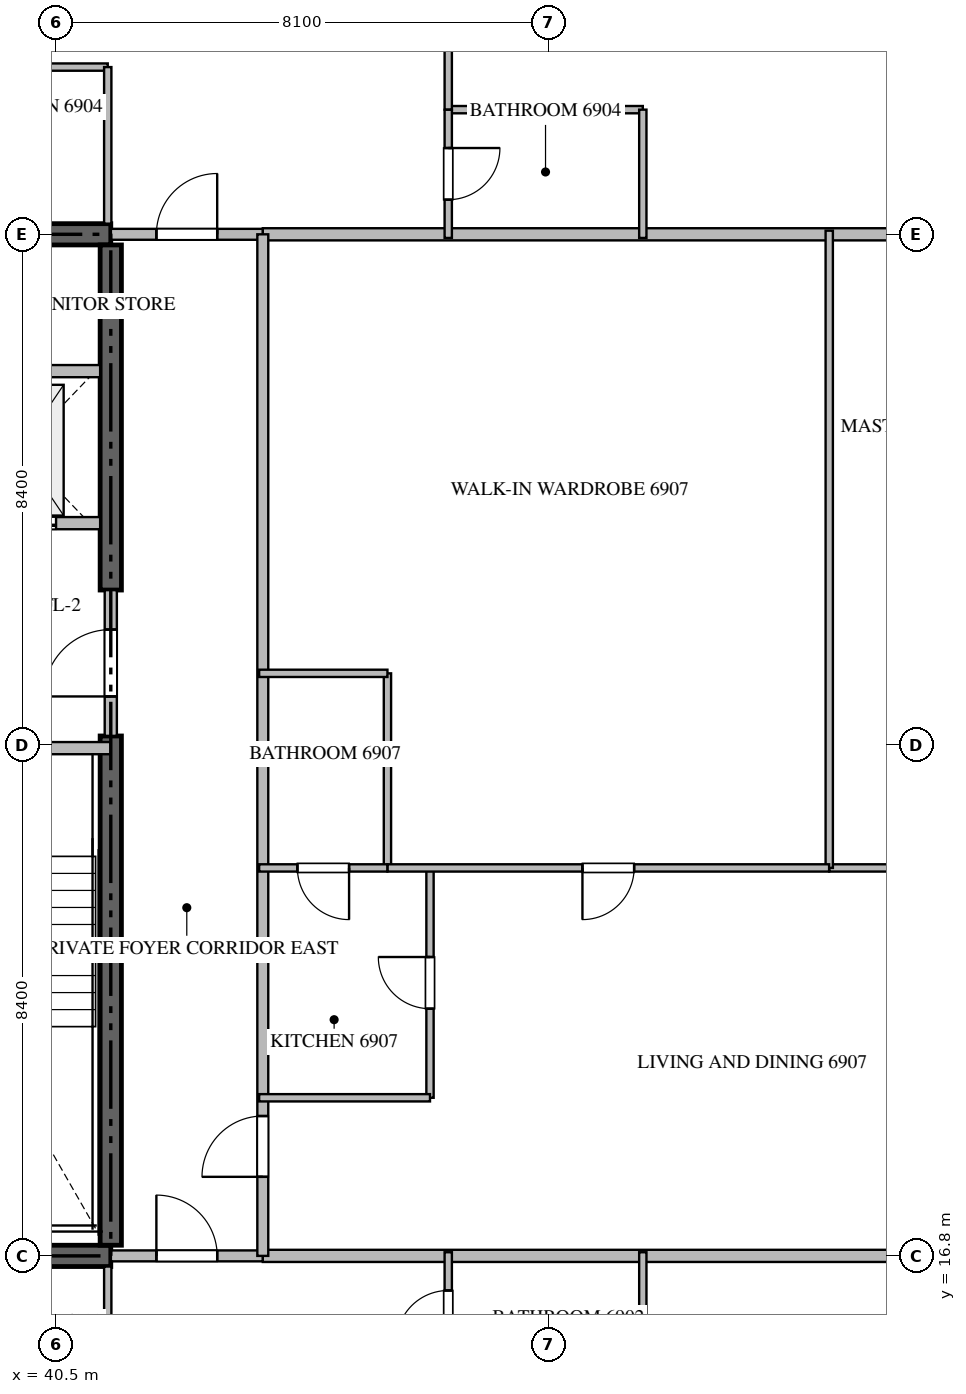
"""IFC4 building model, lengths in metres.
Left out: names, types, materials, properties, quantities, classifications, styles, units other than length and angle.
Written with IfcOpenShell. Run it as: python <this file> out.ifc"""

import sys

from ifc_helpers import new_model, si_unit, direction, frame, frame_2d, origin, place, context, subcontext, project, spatial, rectangle, extrude, source, transform, mapped, element, fill, save


model = new_model("IFC4")
c1 = context("Model", 3, precision=1e-05, world=origin(), true_north=direction((0.0, 1.0)))
c2 = subcontext(c1, "Body", "Model", "MODEL_VIEW")
j1 = project(units=[si_unit("LENGTHUNIT", "METRE"), si_unit("PLANEANGLEUNIT", "RADIAN")], contexts=[c1])
p1 = place(None, origin())
s1 = spatial("IfcSite", under=j1, at=p1, CompositionType="ELEMENT")
p2 = place(p1, origin())
s2 = spatial("IfcBuilding", under=s1, at=p2, CompositionType="ELEMENT")
p3 = place(p2, frame((0.0, 0.0, 275.9)))
s3 = spatial("IfcBuildingStorey", under=s2, at=p3, CompositionType="ELEMENT", Elevation=275.9)
for number, where, z_axis, x_axis in (
    (1, (23.4, 16.8, -0.26), (0.0, 0.0, 1.0), (1.0, 0.0, 0.0)),
    (2, (41.4, 33.6, -0.26), (0.0, 0.0, 1.0), (-1.0, 0.0, 0.0)),
):
    element("IfcWall", number, at=place(p3, frame(where, z_axis=z_axis, x_axis=x_axis)), inside=s3, PredefinedType="SHEAR", context=c2, shape_type="SweptSolid", body=[
        extrude(rectangle(XDim=18.0, YDim=0.35, at=frame_2d((9.0, 0.0))), origin(), (0.0, 0.0, 1.0), 3.848),
    ])
p4 = place(p3, frame((41.4, 16.975, -0.26), z_axis=(0.0, 0.0, 1.0), x_axis=(0.0, 1.0, 0.0)))
e3 = element("IfcWall", 3, at=p4, inside=s3, PredefinedType="SHEAR", context=c2, shape_type="SweptSolid", body=[
    extrude(rectangle(XDim=8.375, YDim=0.35, at=frame_2d((4.188, 0.0))), origin(), (0.0, 0.0, 1.0), 3.848),
])
p5 = place(p3, frame((41.4, 27.75, -0.26), z_axis=(0.0, 0.0, 1.0), x_axis=(0.0, 1.0, 0.0)))
e4 = element("IfcWall", 4, at=p5, inside=s3, PredefinedType="SHEAR", context=c2, shape_type="SweptSolid", body=[
    extrude(rectangle(XDim=5.675, YDim=0.35, at=frame_2d((2.837, 0.0))), origin(), (0.0, 0.0, 1.0), 3.848),
])
p6 = place(p3, frame((36.95, 25.15, 0.0), z_axis=(0.0, 0.0, 1.0), x_axis=(1.0, 0.0, 0.0)))
e5 = element("IfcWall", 5, at=p6, inside=s3, PredefinedType="STANDARD", context=c2, shape_type="SweptSolid", body=[
    extrude(rectangle(XDim=4.45, YDim=0.2, at=frame_2d((2.225, 0.0))), origin(), (0.0, 0.0, 1.0), 3.59),
])
p7 = place(p6, frame((1.65, 0.0, 0.0)))
e6 = element("IfcOpeningElement", 6, at=p7, cuts=e5, PredefinedType="OPENING", context=c2, shape_type="SweptSolid", body=[
    extrude(rectangle(XDim=1.1, YDim=2.15, at=frame_2d((0.55, 1.075))), frame((0.0, 0.11, 0.0), z_axis=(0.0, -1.0, 0.0), x_axis=(1.0, 0.0, 0.0)), (0.0, 0.0, 1.0), 0.22),
])
p8 = place(p3, frame((38.75, 28.85, 0.0), z_axis=(0.0, 0.0, 1.0), x_axis=(1.0, 0.0, 0.0)))
e7 = element("IfcWall", 7, at=p8, inside=s3, PredefinedType="STANDARD", context=c2, shape_type="SweptSolid", body=[
    extrude(rectangle(XDim=2.475, YDim=0.2, at=frame_2d((1.238, 0.0))), origin(), (0.0, 0.0, 1.0), 3.59),
])
p9 = place(p8, frame((0.55, 0.0, 0.0)))
e8 = element("IfcOpeningElement", 8, at=p9, cuts=e7, PredefinedType="OPENING", context=c2, shape_type="SweptSolid", body=[
    extrude(rectangle(XDim=1.2, YDim=2.2, at=frame_2d((0.6, 1.1))), frame((0.0, 0.11, 0.0), z_axis=(0.0, -1.0, 0.0), x_axis=(1.0, 0.0, 0.0)), (0.0, 0.0, 1.0), 0.22),
])
p10 = place(p3, frame((38.75, 31.35, 0.0), z_axis=(0.0, 0.0, 1.0), x_axis=(1.0, 0.0, 0.0)))
e9 = element("IfcWall", 9, at=p10, inside=s3, PredefinedType="STANDARD", context=c2, shape_type="SweptSolid", body=[
    extrude(rectangle(XDim=2.475, YDim=0.2, at=frame_2d((1.238, 0.0))), origin(), (0.0, 0.0, 1.0), 3.59),
])
p11 = place(p3, frame((41.4, 25.352, 0.0), z_axis=(0.0, 0.0, 1.0), x_axis=(0.0, 1.0, 0.0)))
e10 = element("IfcWall", 10, at=p11, inside=s3, PredefinedType="STANDARD", context=c2, shape_type="SweptSolid", body=[
    extrude(rectangle(XDim=2.396, YDim=0.2, at=frame_2d((1.198, 0.0))), origin(), (0.0, 0.0, 1.0), 3.59),
])
p12 = place(p11, frame((0.648, 0.0, 0.0)))
e11 = element("IfcOpeningElement", 11, at=p12, cuts=e10, PredefinedType="OPENING", context=c2, shape_type="SweptSolid", body=[
    extrude(rectangle(XDim=1.1, YDim=2.15, at=frame_2d((0.55, 1.075))), frame((0.0, 0.11, 0.0), z_axis=(0.0, -1.0, 0.0), x_axis=(1.0, 0.0, 0.0)), (0.0, 0.0, 1.0), 0.22),
])
for number, where, z_axis, x_axis in (
    (12, (43.9, 16.8, 0.0), (0.0, 0.0, 1.0), (1.0, 0.0, 0.0)),
    (13, (43.9, 33.6, 0.0), (0.0, 0.0, 1.0), (1.0, 0.0, 0.0)),
):
    element("IfcWall", number, at=place(p3, frame(where, z_axis=z_axis, x_axis=x_axis)), inside=s3, PredefinedType="PARTITIONING", context=c2, shape_type="SweptSolid", body=[
        extrude(rectangle(XDim=13.418, YDim=0.2, at=frame_2d((6.709, 0.0))), origin(), (0.0, 0.0, 1.0), 3.59),
    ])
p13 = place(p3, frame((41.402, 16.8, 0.0), z_axis=(0.0, 0.0, 1.0), x_axis=(1.0, 0.0, 0.0)))
e14 = element("IfcWall", 14, at=p13, inside=s3, PredefinedType="PARTITIONING", context=c2, shape_type="SweptSolid", body=[
    extrude(rectangle(XDim=2.496, YDim=0.18, at=frame_2d((1.248, 0.0))), origin(), (0.0, 0.0, 1.0), 3.59),
])
p14 = place(p13, frame((0.748, 0.0, 0.0)))
e15 = element("IfcOpeningElement", 15, at=p14, cuts=e14, PredefinedType="OPENING", context=c2, shape_type="SweptSolid", body=[
    extrude(rectangle(XDim=1.0, YDim=2.15, at=frame_2d((0.5, 1.075))), frame((0.0, 0.1, 0.0), z_axis=(0.0, -1.0, 0.0), x_axis=(1.0, 0.0, 0.0)), (0.0, 0.0, 1.0), 0.2),
])
p15 = place(p3, frame((41.402, 33.6, 0.0), z_axis=(0.0, 0.0, 1.0), x_axis=(1.0, 0.0, 0.0)))
e16 = element("IfcWall", 16, at=p15, inside=s3, PredefinedType="PARTITIONING", context=c2, shape_type="SweptSolid", body=[
    extrude(rectangle(XDim=2.496, YDim=0.18, at=frame_2d((1.248, 0.0))), origin(), (0.0, 0.0, 1.0), 3.59),
])
p16 = place(p15, frame((0.748, 0.0, 0.0)))
e17 = element("IfcOpeningElement", 17, at=p16, cuts=e16, PredefinedType="OPENING", context=c2, shape_type="SweptSolid", body=[
    extrude(rectangle(XDim=1.0, YDim=2.15, at=frame_2d((0.5, 1.075))), frame((0.0, 0.1, 0.0), z_axis=(0.0, -1.0, 0.0), x_axis=(1.0, 0.0, 0.0)), (0.0, 0.0, 1.0), 0.2),
])
p17 = place(p3, frame((43.9, 16.8, 0.0), z_axis=(0.0, 0.0, 1.0), x_axis=(0.0, 1.0, 0.0)))
e18 = element("IfcWall", 18, at=p17, inside=s3, PredefinedType="PARTITIONING", context=c2, shape_type="SweptSolid", body=[
    extrude(rectangle(XDim=16.8, YDim=0.18, at=frame_2d((8.4, 0.0))), origin(), (0.0, 0.0, 1.0), 3.59),
])
p18 = place(p17, frame((1.3, 0.0, 0.0)))
e19 = element("IfcOpeningElement", 19, at=p18, cuts=e18, PredefinedType="OPENING", context=c2, shape_type="SweptSolid", body=[
    extrude(rectangle(XDim=1.0, YDim=2.15, at=frame_2d((0.5, 1.075))), frame((0.0, 0.1, 0.0), z_axis=(0.0, -1.0, 0.0), x_axis=(1.0, 0.0, 0.0)), (0.0, 0.0, 1.0), 0.2),
])
p19 = place(p3, frame((41.35, 14.05, 0.0), z_axis=(0.0, 0.0, 1.0), x_axis=(0.0, 1.0, 0.0)))
e20 = element("IfcWall", 20, at=p19, inside=s3, PredefinedType="PARTITIONING", context=c2, shape_type="SweptSolid", body=[
    extrude(rectangle(XDim=2.575, YDim=0.12, at=frame_2d((1.288, 0.0))), origin(), (0.0, 0.0, 1.0), 3.59),
])
p20 = place(p3, frame((50.15, 14.75, 0.0), z_axis=(0.0, 0.0, 1.0), x_axis=(0.0, 1.0, 0.0)))
e21 = element("IfcWall", 21, at=p20, inside=s3, PredefinedType="PARTITIONING", context=c2, shape_type="SweptSolid", body=[
    extrude(rectangle(XDim=2.11, YDim=0.12, at=frame_2d((1.055, 0.0))), origin(), (0.0, 0.0, 1.0), 3.59),
])
p21 = place(p3, frame((46.95, 14.752, 0.0), z_axis=(0.0, 0.0, 1.0), x_axis=(0.0, 1.0, 0.0)))
e22 = element("IfcWall", 22, at=p21, inside=s3, PredefinedType="PARTITIONING", context=c2, shape_type="SweptSolid", body=[
    extrude(rectangle(XDim=2.108, YDim=0.12, at=frame_2d((1.054, 0.0))), origin(), (0.0, 0.0, 1.0), 3.59),
])
p22 = place(p21, frame((0.629, 0.0, 0.0)))
e23 = element("IfcOpeningElement", 23, at=p22, cuts=e22, PredefinedType="OPENING", context=c2, shape_type="SweptSolid", body=[
    extrude(rectangle(XDim=0.85, YDim=2.1, at=frame_2d((0.425, 1.05))), frame((0.0, 0.07, 0.0), z_axis=(0.0, -1.0, 0.0), x_axis=(1.0, 0.0, 0.0)), (0.0, 0.0, 1.0), 0.14),
])
p23 = place(p3, frame((38.5, 36.35, 0.0), z_axis=(0.0, 0.0, 1.0), x_axis=(1.0, 0.0, 0.0)))
e24 = element("IfcWall", 24, at=p23, inside=s3, PredefinedType="PARTITIONING", context=c2, shape_type="SweptSolid", body=[
    extrude(rectangle(XDim=2.85, YDim=0.12, at=frame_2d((1.425, 0.0))), origin(), (0.0, 0.0, 1.0), 3.59),
])
p24 = place(p23, frame((1.0, 0.0, 0.0)))
e25 = element("IfcOpeningElement", 25, at=p24, cuts=e24, PredefinedType="OPENING", context=c2, shape_type="SweptSolid", body=[
    extrude(rectangle(XDim=0.85, YDim=2.1, at=frame_2d((0.425, 1.05))), frame((0.0, 0.07, 0.0), z_axis=(0.0, -1.0, 0.0), x_axis=(1.0, 0.0, 0.0)), (0.0, 0.0, 1.0), 0.14),
])
p25 = place(p3, frame((41.35, 36.35, 0.0), z_axis=(0.0, 0.0, 1.0), x_axis=(0.0, -1.0, 0.0)))
e26 = element("IfcWall", 26, at=p25, inside=s3, PredefinedType="PARTITIONING", context=c2, shape_type="SweptSolid", body=[
    extrude(rectangle(XDim=2.575, YDim=0.12, at=frame_2d((1.288, 0.0))), origin(), (0.0, 0.0, 1.0), 3.59),
])
p26 = place(p3, frame((46.95, 35.65, 0.0), z_axis=(0.0, 0.0, 1.0), x_axis=(1.0, 0.0, 0.0)))
e27 = element("IfcWall", 27, at=p26, inside=s3, PredefinedType="PARTITIONING", context=c2, shape_type="SweptSolid", body=[
    extrude(rectangle(XDim=3.2, YDim=0.12, at=frame_2d((1.6, 0.0))), origin(), (0.0, 0.0, 1.0), 3.59),
])
p27 = place(p3, frame((50.15, 35.65, 0.0), z_axis=(0.0, 0.0, 1.0), x_axis=(0.0, -1.0, 0.0)))
e28 = element("IfcWall", 28, at=p27, inside=s3, PredefinedType="PARTITIONING", context=c2, shape_type="SweptSolid", body=[
    extrude(rectangle(XDim=2.11, YDim=0.12, at=frame_2d((1.055, 0.0))), origin(), (0.0, 0.0, 1.0), 3.59),
])
p28 = place(p3, frame((46.95, 41.73, 0.0), z_axis=(0.0, 0.0, 1.0), x_axis=(0.0, -1.0, 0.0)))
e29 = element("IfcWall", 29, at=p28, inside=s3, PredefinedType="PARTITIONING", context=c2, shape_type="SweptSolid", body=[
    extrude(rectangle(XDim=6.08, YDim=0.12, at=frame_2d((3.04, 0.0))), origin(), (0.0, 0.0, 1.0), 3.59),
])
p29 = place(p28, frame((2.615, 0.0, 0.0)))
e30 = element("IfcOpeningElement", 30, at=p29, cuts=e29, PredefinedType="OPENING", context=c2, shape_type="SweptSolid", body=[
    extrude(rectangle(XDim=0.85, YDim=2.1, at=frame_2d((0.425, 1.05))), frame((0.0, 0.07, 0.0), z_axis=(0.0, -1.0, 0.0), x_axis=(1.0, 0.0, 0.0)), (0.0, 0.0, 1.0), 0.14),
])
p30 = place(p3, frame((46.95, 35.648, 0.0), z_axis=(0.0, 0.0, 1.0), x_axis=(0.0, -1.0, 0.0)))
e31 = element("IfcWall", 31, at=p30, inside=s3, PredefinedType="PARTITIONING", context=c2, shape_type="SweptSolid", body=[
    extrude(rectangle(XDim=2.108, YDim=0.12, at=frame_2d((1.054, 0.0))), origin(), (0.0, 0.0, 1.0), 3.59),
])
p31 = place(p30, frame((0.629, 0.0, 0.0)))
e32 = element("IfcOpeningElement", 32, at=p31, cuts=e31, PredefinedType="OPENING", context=c2, shape_type="SweptSolid", body=[
    extrude(rectangle(XDim=0.85, YDim=2.1, at=frame_2d((0.425, 1.05))), frame((0.0, 0.07, 0.0), z_axis=(0.0, -1.0, 0.0), x_axis=(1.0, 0.0, 0.0)), (0.0, 0.0, 1.0), 0.14),
])
p32 = place(p3, frame((46.65, 19.4, 0.0), z_axis=(0.0, 0.0, 1.0), x_axis=(0.0, 1.0, 0.0)))
e33 = element("IfcWall", 33, at=p32, inside=s3, PredefinedType="PARTITIONING", context=c2, shape_type="SweptSolid", body=[
    extrude(rectangle(XDim=3.78, YDim=0.12, at=frame_2d((1.89, 0.0))), origin(), (0.0, 0.0, 1.0), 3.59),
])
p33 = place(p32, frame((1.465, 0.0, 0.0)))
e34 = element("IfcOpeningElement", 34, at=p33, cuts=e33, PredefinedType="OPENING", context=c2, shape_type="SweptSolid", body=[
    extrude(rectangle(XDim=0.85, YDim=2.1, at=frame_2d((0.425, 1.05))), frame((0.0, 0.07, 0.0), z_axis=(0.0, -1.0, 0.0), x_axis=(1.0, 0.0, 0.0)), (0.0, 0.0, 1.0), 0.14),
])
p34 = place(p3, frame((46.65, 19.4, 0.0), z_axis=(0.0, 0.0, 1.0), x_axis=(-1.0, 0.0, 0.0)))
e35 = element("IfcWall", 35, at=p34, inside=s3, PredefinedType="PARTITIONING", context=c2, shape_type="SweptSolid", body=[
    extrude(rectangle(XDim=2.81, YDim=0.12, at=frame_2d((1.405, 0.0))), origin(), (0.0, 0.0, 1.0), 3.59),
])
p35 = place(p3, frame((57.305, 23.18, 0.0), z_axis=(0.0, 0.0, 1.0), x_axis=(-1.0, 0.0, 0.0)))
e36 = element("IfcWall", 36, at=p35, inside=s3, PredefinedType="PARTITIONING", context=c2, shape_type="SweptSolid", body=[
    extrude(rectangle(XDim=4.089, YDim=0.12, at=frame_2d((2.044, 0.0))), origin(), (0.0, 0.0, 1.0), 3.59),
])
p36 = place(p35, frame((1.754, 0.0, 0.0)))
e37 = element("IfcOpeningElement", 37, at=p36, cuts=e36, PredefinedType="OPENING", context=c2, shape_type="SweptSolid", body=[
    extrude(rectangle(XDim=0.9, YDim=2.1, at=frame_2d((0.45, 1.05))), frame((0.0, 0.07, 0.0), z_axis=(0.0, -1.0, 0.0), x_axis=(1.0, 0.0, 0.0)), (0.0, 0.0, 1.0), 0.14),
])
p37 = place(p3, frame((53.216, 23.18, 0.0), z_axis=(0.0, 0.0, 1.0), x_axis=(0.0, 1.0, 0.0)))
e38 = element("IfcWall", 38, at=p37, inside=s3, PredefinedType="PARTITIONING", context=c2, shape_type="SweptSolid", body=[
    extrude(rectangle(XDim=10.48, YDim=0.12, at=frame_2d((5.24, 0.0))), origin(), (0.0, 0.0, 1.0), 3.59),
])
p38 = place(p3, frame((45.95, 23.18, 0.0), z_axis=(0.0, 0.0, 1.0), x_axis=(0.0, 1.0, 0.0)))
e39 = element("IfcWall", 39, at=p38, inside=s3, PredefinedType="PARTITIONING", context=c2, shape_type="SweptSolid", body=[
    extrude(rectangle(XDim=3.2, YDim=0.12, at=frame_2d((1.6, 0.0))), origin(), (0.0, 0.0, 1.0), 3.59),
])
p39 = place(p3, frame((45.95, 26.38, 0.0), z_axis=(0.0, 0.0, 1.0), x_axis=(-1.0, 0.0, 0.0)))
e40 = element("IfcWall", 40, at=p39, inside=s3, PredefinedType="PARTITIONING", context=c2, shape_type="SweptSolid", body=[
    extrude(rectangle(XDim=2.11, YDim=0.12, at=frame_2d((1.055, 0.0))), origin(), (0.0, 0.0, 1.0), 3.59),
])
p40 = place(p3, frame((53.214, 23.18, 0.0), z_axis=(0.0, 0.0, 1.0), x_axis=(-1.0, 0.0, 0.0)))
e41 = element("IfcWall", 41, at=p40, inside=s3, PredefinedType="PARTITIONING", context=c2, shape_type="SweptSolid", body=[
    extrude(rectangle(XDim=7.264, YDim=0.12, at=frame_2d((3.632, 0.0))), origin(), (0.0, 0.0, 1.0), 3.59),
])
p41 = place(p40, frame((3.207, 0.0, 0.0)))
e42 = element("IfcOpeningElement", 42, at=p41, cuts=e41, PredefinedType="OPENING", context=c2, shape_type="SweptSolid", body=[
    extrude(rectangle(XDim=0.85, YDim=2.1, at=frame_2d((0.425, 1.05))), frame((0.0, 0.07, 0.0), z_axis=(0.0, -1.0, 0.0), x_axis=(1.0, 0.0, 0.0)), (0.0, 0.0, 1.0), 0.14),
])
p42 = place(p3, frame((45.948, 23.18, 0.0), z_axis=(0.0, 0.0, 1.0), x_axis=(-1.0, 0.0, 0.0)))
e43 = element("IfcWall", 43, at=p42, inside=s3, PredefinedType="PARTITIONING", context=c2, shape_type="SweptSolid", body=[
    extrude(rectangle(XDim=2.108, YDim=0.12, at=frame_2d((1.054, 0.0))), origin(), (0.0, 0.0, 1.0), 3.59),
])
p43 = place(p42, frame((0.629, 0.0, 0.0)))
e44 = element("IfcOpeningElement", 44, at=p43, cuts=e43, PredefinedType="OPENING", context=c2, shape_type="SweptSolid", body=[
    extrude(rectangle(XDim=0.85, YDim=2.1, at=frame_2d((0.425, 1.05))), frame((0.0, 0.07, 0.0), z_axis=(0.0, -1.0, 0.0), x_axis=(1.0, 0.0, 0.0)), (0.0, 0.0, 1.0), 0.14),
])
m1 = source(origin(), c2, "Body", "SweptSolid", [
    extrude(rectangle(XDim=1.2, YDim=2.2, at=frame_2d((0.6, 1.1))), frame((0.0, 0.025, 0.0), z_axis=(0.0, -1.0, 0.0), x_axis=(1.0, 0.0, 0.0)), (0.0, 0.0, 1.0), 0.05),
])
p44 = place(p9, origin())
e45 = element("IfcDoor", 45, at=p44, inside=s3, OperationType="DOUBLE_DOOR_SLIDING", PredefinedType="DOOR", context=c2, shape_type="MappedRepresentation", body=[
    mapped(m1, transform((0.0, 0.0, 0.0), scale=1.0)),
])
fill(e8, e45)
m2 = source(origin(), c2, "Body", "SweptSolid", [
    extrude(rectangle(XDim=1.1, YDim=2.15, at=frame_2d((0.55, 1.075))), frame((0.0, 0.025, 0.0), z_axis=(0.0, -1.0, 0.0), x_axis=(1.0, 0.0, 0.0)), (0.0, 0.0, 1.0), 0.05),
])
p45 = place(p12, origin())
e46 = element("IfcDoor", 46, at=p45, inside=s3, OperationType="SINGLE_SWING_LEFT", PredefinedType="DOOR", context=c2, shape_type="MappedRepresentation", body=[
    mapped(m2, transform((0.0, 0.0, 0.0), scale=1.0)),
])
fill(e11, e46)
m3 = source(origin(), c2, "Body", "SweptSolid", [
    extrude(rectangle(XDim=1.0, YDim=2.15, at=frame_2d((0.5, 1.075))), frame((0.0, 0.025, 0.0), z_axis=(0.0, -1.0, 0.0), x_axis=(1.0, 0.0, 0.0)), (0.0, 0.0, 1.0), 0.05),
])
p46 = place(p14, origin())
e47 = element("IfcDoor", 47, at=p46, inside=s3, OperationType="SINGLE_SWING_LEFT", PredefinedType="DOOR", context=c2, shape_type="MappedRepresentation", body=[
    mapped(m3, transform((0.0, 0.0, 0.0), scale=1.0)),
])
fill(e15, e47)
p47 = place(p16, origin())
e48 = element("IfcDoor", 48, at=p47, inside=s3, OperationType="SINGLE_SWING_RIGHT", PredefinedType="DOOR", context=c2, shape_type="MappedRepresentation", body=[
    mapped(m3, transform((0.0, 0.0, 0.0), scale=1.0)),
])
fill(e17, e48)
p48 = place(p18, origin())
e49 = element("IfcDoor", 49, at=p48, inside=s3, OperationType="SINGLE_SWING_LEFT", PredefinedType="DOOR", context=c2, shape_type="MappedRepresentation", body=[
    mapped(m3, transform((0.0, 0.0, 0.0), scale=1.0)),
])
fill(e19, e49)
m4 = source(origin(), c2, "Body", "SweptSolid", [
    extrude(rectangle(XDim=0.85, YDim=2.1, at=frame_2d((0.425, 1.05))), frame((0.0, 0.025, 0.0), z_axis=(0.0, -1.0, 0.0), x_axis=(1.0, 0.0, 0.0)), (0.0, 0.0, 1.0), 0.05),
])
p49 = place(p22, origin())
e50 = element("IfcDoor", 50, at=p49, inside=s3, OperationType="SINGLE_SWING_LEFT", PredefinedType="DOOR", context=c2, shape_type="MappedRepresentation", body=[
    mapped(m4, transform((0.0, 0.0, 0.0), scale=1.0)),
])
fill(e23, e50)
p50 = place(p31, origin())
e51 = element("IfcDoor", 51, at=p50, inside=s3, OperationType="SINGLE_SWING_LEFT", PredefinedType="DOOR", context=c2, shape_type="MappedRepresentation", body=[
    mapped(m4, transform((0.0, 0.0, 0.0), scale=1.0)),
])
fill(e32, e51)
p51 = place(p33, origin())
e52 = element("IfcDoor", 52, at=p51, inside=s3, OperationType="SINGLE_SWING_RIGHT", PredefinedType="DOOR", context=c2, shape_type="MappedRepresentation", body=[
    mapped(m4, transform((0.0, 0.0, 0.0), scale=1.0)),
])
fill(e34, e52)
p52 = place(p41, origin())
e53 = element("IfcDoor", 53, at=p52, inside=s3, OperationType="SINGLE_SWING_RIGHT", PredefinedType="DOOR", context=c2, shape_type="MappedRepresentation", body=[
    mapped(m4, transform((0.0, 0.0, 0.0), scale=1.0)),
])
fill(e42, e53)
p53 = place(p43, origin())
e54 = element("IfcDoor", 54, at=p53, inside=s3, OperationType="SINGLE_SWING_LEFT", PredefinedType="DOOR", context=c2, shape_type="MappedRepresentation", body=[
    mapped(m4, transform((0.0, 0.0, 0.0), scale=1.0)),
])
fill(e44, e54)
save(model, sys.argv[1])
